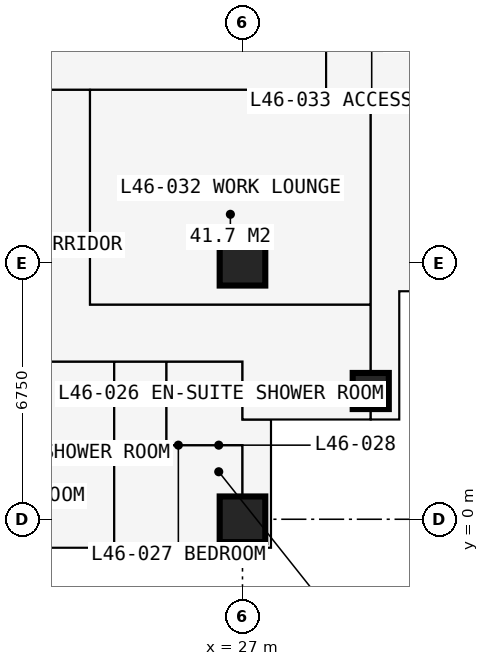
"""IFC4 building model, lengths in metres.
Left out: names, types, materials, properties, quantities, classifications, styles, units other than length and angle.
Written with IfcOpenShell. Run it as: python <this file> out.ifc"""

import sys

from ifc_helpers import new_model, si_unit, direction, frame, frame_2d, origin, origin_2d, place, context, subcontext, project, spatial, rectangle, extrude, element, fill, save


model = new_model("IFC4")
c1 = context("Model", 3, precision=1e-05, world=origin(), true_north=direction((0.0, 1.0)))
c2 = subcontext(c1, "Body", "Model", "MODEL_VIEW")
j1 = project(units=[si_unit("LENGTHUNIT", "METRE"), si_unit("PLANEANGLEUNIT", "RADIAN")], contexts=[c1])
p1 = place(None, origin())
s1 = spatial("IfcSite", under=j1, at=p1, CompositionType="ELEMENT")
p2 = place(p1, origin())
s2 = spatial("IfcBuilding", under=s1, at=p2, CompositionType="ELEMENT")
p3 = place(p2, frame((0.0, 0.0, 171.0)))
s3 = spatial("IfcBuildingStorey", under=s2, at=p3, CompositionType="ELEMENT", Elevation=171.0)
for number, where, z_axis, x_axis in (
    (1, (27.0, 0.0, 0.0), (0.0, 0.0, 1.0), (1.0, 0.0, 0.0)),
    (2, (27.0, 6.75, 0.0), (0.0, 0.0, 1.0), (1.0, 0.0, 0.0)),
):
    element("IfcColumn", number, at=place(p3, frame(where, z_axis=z_axis, x_axis=x_axis)), inside=s3, PredefinedType="COLUMN", context=c2, shape_type="SweptSolid", body=[
        extrude(rectangle(XDim=1.2, YDim=1.2, at=origin_2d()), origin(), (0.0, 0.0, 1.0), 3.6),
    ])
p4 = place(p3, frame((30.375, 3.375, 0.0), z_axis=(0.0, 0.0, 1.0), x_axis=(1.0, 0.0, 0.0)))
e3 = element("IfcColumn", 3, at=p4, inside=s3, PredefinedType="COLUMN", context=c2, shape_type="SweptSolid", body=[
    extrude(rectangle(XDim=0.95, YDim=0.95, at=origin_2d()), origin(), (0.0, 0.0, 1.0), 3.6),
])
p5 = place(p3, frame((27.75, -0.75, 0.0), z_axis=(0.0, 0.0, 1.0), x_axis=(0.0, 1.0, 0.0)))
e4 = element("IfcWall", 4, at=p5, inside=s3, PredefinedType="SOLIDWALL", context=c2, shape_type="SweptSolid", body=[
    extrude(rectangle(XDim=3.375, YDim=0.3, at=frame_2d((1.688, 0.0))), origin(), (0.0, 0.0, 1.0), 3.375),
])
p6 = place(p5, frame((0.788, 0.0, 0.6)))
e5 = element("IfcOpeningElement", 5, at=p6, cuts=e4, PredefinedType="OPENING", context=c2, shape_type="SweptSolid", body=[
    extrude(rectangle(XDim=1.8, YDim=2.1, at=frame_2d((0.9, 1.05))), frame((0.0, 0.16, 0.0), z_axis=(0.0, -1.0, 0.0), x_axis=(1.0, 0.0, 0.0)), (0.0, 0.0, 1.0), 0.32),
])
p7 = place(p3, frame((27.75, 2.625, 0.0), z_axis=(0.0, 0.0, 1.0), x_axis=(1.0, 0.0, 0.0)))
e6 = element("IfcWall", 6, at=p7, inside=s3, PredefinedType="SOLIDWALL", context=c2, shape_type="SweptSolid", body=[
    extrude(rectangle(XDim=3.375, YDim=0.3, at=frame_2d((1.688, 0.0))), origin(), (0.0, 0.0, 1.0), 3.375),
])
p8 = place(p7, frame((0.788, 0.0, 0.6)))
e7 = element("IfcOpeningElement", 7, at=p8, cuts=e6, PredefinedType="OPENING", context=c2, shape_type="SweptSolid", body=[
    extrude(rectangle(XDim=1.8, YDim=2.1, at=frame_2d((0.9, 1.05))), frame((0.0, 0.16, 0.0), z_axis=(0.0, -1.0, 0.0), x_axis=(1.0, 0.0, 0.0)), (0.0, 0.0, 1.0), 0.32),
])
p9 = place(p3, frame((31.125, 2.625, 0.0), z_axis=(0.0, 0.0, 1.0), x_axis=(0.0, 1.0, 0.0)))
e8 = element("IfcWall", 8, at=p9, inside=s3, PredefinedType="SOLIDWALL", context=c2, shape_type="SweptSolid", body=[
    extrude(rectangle(XDim=3.375, YDim=0.3, at=frame_2d((1.688, 0.0))), origin(), (0.0, 0.0, 1.0), 3.375),
])
p10 = place(p9, frame((0.788, 0.0, 0.6)))
e9 = element("IfcOpeningElement", 9, at=p10, cuts=e8, PredefinedType="OPENING", context=c2, shape_type="SweptSolid", body=[
    extrude(rectangle(XDim=1.8, YDim=2.1, at=frame_2d((0.9, 1.05))), frame((0.0, 0.16, 0.0), z_axis=(0.0, -1.0, 0.0), x_axis=(1.0, 0.0, 0.0)), (0.0, 0.0, 1.0), 0.32),
])
p11 = place(p3, frame((31.125, 6.0, 0.0), z_axis=(0.0, 0.0, 1.0), x_axis=(1.0, 0.0, 0.0)))
e10 = element("IfcWall", 10, at=p11, inside=s3, PredefinedType="SOLIDWALL", context=c2, shape_type="SweptSolid", body=[
    extrude(rectangle(XDim=3.375, YDim=0.3, at=frame_2d((1.688, 0.0))), origin(), (0.0, 0.0, 1.0), 3.375),
])
p12 = place(p11, frame((0.788, 0.0, 0.6)))
e11 = element("IfcOpeningElement", 11, at=p12, cuts=e10, PredefinedType="OPENING", context=c2, shape_type="SweptSolid", body=[
    extrude(rectangle(XDim=1.8, YDim=2.1, at=frame_2d((0.9, 1.05))), frame((0.0, 0.16, 0.0), z_axis=(0.0, -1.0, 0.0), x_axis=(1.0, 0.0, 0.0)), (0.0, 0.0, 1.0), 0.32),
])
p13 = place(p3, frame((6.75, 4.15, 0.0), z_axis=(0.0, 0.0, 1.0), x_axis=(1.0, 0.0, 0.0)))
e12 = element("IfcWall", 12, at=p13, inside=s3, PredefinedType="PARTITIONING", context=c2, shape_type="SweptSolid", body=[
    extrude(rectangle(XDim=20.25, YDim=0.15, at=frame_2d((10.125, 0.0))), origin(), (0.0, 0.0, 1.0), 3.375),
])
p14 = place(p13, frame((0.2, 0.0, 0.0)))
e13 = element("IfcOpeningElement", 13, at=p14, cuts=e12, PredefinedType="OPENING", context=c2, shape_type="SweptSolid", body=[
    extrude(rectangle(XDim=0.95, YDim=2.2, at=frame_2d((0.475, 1.1))), frame((0.0, 0.085, 0.0), z_axis=(0.0, -1.0, 0.0), x_axis=(1.0, 0.0, 0.0)), (0.0, 0.0, 1.0), 0.17),
])
p15 = place(p13, frame((3.625, 0.0, 0.0)))
e14 = element("IfcOpeningElement", 14, at=p15, cuts=e12, PredefinedType="OPENING", context=c2, shape_type="SweptSolid", body=[
    extrude(rectangle(XDim=0.95, YDim=2.2, at=frame_2d((0.475, 1.1))), frame((0.0, 0.085, 0.0), z_axis=(0.0, -1.0, 0.0), x_axis=(1.0, 0.0, 0.0)), (0.0, 0.0, 1.0), 0.17),
])
p16 = place(p13, frame((7.0, 0.0, 0.0)))
e15 = element("IfcOpeningElement", 15, at=p16, cuts=e12, PredefinedType="OPENING", context=c2, shape_type="SweptSolid", body=[
    extrude(rectangle(XDim=0.95, YDim=2.2, at=frame_2d((0.475, 1.1))), frame((0.0, 0.085, 0.0), z_axis=(0.0, -1.0, 0.0), x_axis=(1.0, 0.0, 0.0)), (0.0, 0.0, 1.0), 0.17),
])
p17 = place(p13, frame((10.375, 0.0, 0.0)))
e16 = element("IfcOpeningElement", 16, at=p17, cuts=e12, PredefinedType="OPENING", context=c2, shape_type="SweptSolid", body=[
    extrude(rectangle(XDim=0.95, YDim=2.2, at=frame_2d((0.475, 1.1))), frame((0.0, 0.085, 0.0), z_axis=(0.0, -1.0, 0.0), x_axis=(1.0, 0.0, 0.0)), (0.0, 0.0, 1.0), 0.17),
])
p18 = place(p13, frame((13.75, 0.0, 0.0)))
e17 = element("IfcOpeningElement", 17, at=p18, cuts=e12, PredefinedType="OPENING", context=c2, shape_type="SweptSolid", body=[
    extrude(rectangle(XDim=0.95, YDim=2.2, at=frame_2d((0.475, 1.1))), frame((0.0, 0.085, 0.0), z_axis=(0.0, -1.0, 0.0), x_axis=(1.0, 0.0, 0.0)), (0.0, 0.0, 1.0), 0.17),
])
p19 = place(p13, frame((17.125, 0.0, 0.0)))
e18 = element("IfcOpeningElement", 18, at=p19, cuts=e12, PredefinedType="OPENING", context=c2, shape_type="SweptSolid", body=[
    extrude(rectangle(XDim=0.95, YDim=2.2, at=frame_2d((0.475, 1.1))), frame((0.0, 0.085, 0.0), z_axis=(0.0, -1.0, 0.0), x_axis=(1.0, 0.0, 0.0)), (0.0, 0.0, 1.0), 0.17),
])
p20 = place(p3, frame((10.125, 11.3, 0.0), z_axis=(0.0, 0.0, 1.0), x_axis=(1.0, 0.0, 0.0)))
e19 = element("IfcWall", 19, at=p20, inside=s3, PredefinedType="PARTITIONING", context=c2, shape_type="SweptSolid", body=[
    extrude(rectangle(XDim=21.475, YDim=0.15, at=frame_2d((10.738, 0.0))), origin(), (0.0, 0.0, 1.0), 3.375),
])
p21 = place(p20, frame((11.312, 0.0, 0.0)))
e20 = element("IfcOpeningElement", 20, at=p21, cuts=e19, PredefinedType="OPENING", context=c2, shape_type="SweptSolid", body=[
    extrude(rectangle(XDim=1.0, YDim=2.2, at=frame_2d((0.5, 1.1))), frame((0.0, 0.085, 0.0), z_axis=(0.0, -1.0, 0.0), x_axis=(1.0, 0.0, 0.0)), (0.0, 0.0, 1.0), 0.17),
])
p22 = place(p3, frame((21.625, 1.95, 0.0), z_axis=(0.0, 0.0, 1.0), x_axis=(1.0, 0.0, 0.0)))
e21 = element("IfcWall", 21, at=p22, inside=s3, PredefinedType="PARTITIONING", context=c2, shape_type="SweptSolid", body=[
    extrude(rectangle(XDim=2.0, YDim=0.1, at=frame_2d((1.0, 0.0))), origin(), (0.0, 0.0, 1.0), 3.375),
])
p23 = place(p3, frame((22.988, 5.65, 0.0), z_axis=(0.0, 0.0, 1.0), x_axis=(1.0, 0.0, 0.0)))
e22 = element("IfcWall", 22, at=p23, inside=s3, PredefinedType="PARTITIONING", context=c2, shape_type="SweptSolid", body=[
    extrude(rectangle(XDim=7.387, YDim=0.15, at=frame_2d((3.694, 0.0))), origin(), (0.0, 0.0, 1.0), 3.375),
])
p24 = place(p23, frame((2.45, 0.0, 0.0)))
e23 = element("IfcOpeningElement", 23, at=p24, cuts=e22, PredefinedType="OPENING", context=c2, shape_type="SweptSolid", body=[
    extrude(rectangle(XDim=0.95, YDim=2.2, at=frame_2d((0.475, 1.1))), frame((0.0, 0.085, 0.0), z_axis=(0.0, -1.0, 0.0), x_axis=(1.0, 0.0, 0.0)), (0.0, 0.0, 1.0), 0.17),
])
p25 = place(p3, frame((22.988, 5.65, 0.0), z_axis=(0.0, 0.0, 1.0), x_axis=(0.0, 1.0, 0.0)))
e24 = element("IfcWall", 24, at=p25, inside=s3, PredefinedType="PARTITIONING", context=c2, shape_type="SweptSolid", body=[
    extrude(rectangle(XDim=5.65, YDim=0.15, at=frame_2d((2.825, 0.0))), origin(), (0.0, 0.0, 1.0), 3.375),
])
p26 = place(p3, frame((23.625, -0.734, 0.0), z_axis=(0.0, 0.0, 1.0), x_axis=(0.0, 1.0, 0.0)))
e25 = element("IfcWall", 25, at=p26, inside=s3, PredefinedType="PARTITIONING", context=c2, shape_type="SweptSolid", body=[
    extrude(rectangle(XDim=4.884, YDim=0.175, at=frame_2d((2.442, 0.0))), origin(), (0.0, 0.0, 1.0), 3.375),
])
p27 = place(p3, frame((25.0, 1.95, 0.0), z_axis=(0.0, 0.0, 1.0), x_axis=(0.0, 1.0, 0.0)))
e26 = element("IfcWall", 26, at=p27, inside=s3, PredefinedType="PARTITIONING", context=c2, shape_type="SweptSolid", body=[
    extrude(rectangle(XDim=2.2, YDim=0.1, at=frame_2d((1.1, 0.0))), origin(), (0.0, 0.0, 1.0), 3.375),
])
p28 = place(p3, frame((25.0, 1.95, 0.0), z_axis=(0.0, 0.0, 1.0), x_axis=(1.0, 0.0, 0.0)))
e27 = element("IfcWall", 27, at=p28, inside=s3, PredefinedType="PARTITIONING", context=c2, shape_type="SweptSolid", body=[
    extrude(rectangle(XDim=2.0, YDim=0.1, at=frame_2d((1.0, 0.0))), origin(), (0.0, 0.0, 1.0), 3.375),
])
p29 = place(p3, frame((27.0, -0.734, 0.0), z_axis=(0.0, 0.0, 1.0), x_axis=(0.0, 1.0, 0.0)))
e28 = element("IfcWall", 28, at=p29, inside=s3, PredefinedType="PARTITIONING", context=c2, shape_type="SweptSolid", body=[
    extrude(rectangle(XDim=2.684, YDim=0.1, at=frame_2d((1.342, 0.0))), origin(), (0.0, 0.0, 1.0), 2.877),
])
p30 = place(p29, frame((1.35, 0.0, 0.0)))
e29 = element("IfcOpeningElement", 29, at=p30, cuts=e28, PredefinedType="OPENING", context=c2, shape_type="SweptSolid", body=[
    extrude(rectangle(XDim=0.9, YDim=2.2, at=frame_2d((0.45, 1.1))), frame((0.0, 0.06, 0.0), z_axis=(0.0, -1.0, 0.0), x_axis=(1.0, 0.0, 0.0)), (0.0, 0.0, 1.0), 0.12),
])
p31 = place(p3, frame((27.0, 2.625, 0.0), z_axis=(0.0, 0.0, 1.0), x_axis=(0.0, 1.0, 0.0)))
e30 = element("IfcWall", 30, at=p31, inside=s3, PredefinedType="PARTITIONING", context=c2, shape_type="SweptSolid", body=[
    extrude(rectangle(XDim=1.525, YDim=0.1, at=frame_2d((0.762, 0.0))), origin(), (0.0, 0.0, 1.0), 2.877),
])
p32 = place(p3, frame((27.0, 2.625, 0.0), z_axis=(0.0, 0.0, 1.0), x_axis=(1.0, 0.0, 0.0)))
e31 = element("IfcWall", 31, at=p32, inside=s3, PredefinedType="PARTITIONING", context=c2, shape_type="SweptSolid", body=[
    extrude(rectangle(XDim=0.734, YDim=0.1, at=frame_2d((0.367, 0.0))), origin(), (0.0, 0.0, 1.0), 3.375),
])
p33 = place(p3, frame((29.2, 11.3, 0.0), z_axis=(0.0, 0.0, 1.0), x_axis=(0.0, 1.0, 0.0)))
e32 = element("IfcWall", 32, at=p33, inside=s3, PredefinedType="PARTITIONING", context=c2, shape_type="SweptSolid", body=[
    extrude(rectangle(XDim=19.809, YDim=0.15, at=frame_2d((9.904, 0.0))), origin(), (0.0, 0.0, 1.0), 3.375),
])
p34 = place(p33, frame((0.55, 0.0, 0.0)))
e33 = element("IfcOpeningElement", 33, at=p34, cuts=e32, PredefinedType="OPENING", context=c2, shape_type="SweptSolid", body=[
    extrude(rectangle(XDim=1.0, YDim=2.2, at=frame_2d((0.5, 1.1))), frame((0.0, 0.085, 0.0), z_axis=(0.0, -1.0, 0.0), x_axis=(1.0, 0.0, 0.0)), (0.0, 0.0, 1.0), 0.17),
])
p35 = place(p33, frame((2.65, 0.0, 0.0)))
e34 = element("IfcOpeningElement", 34, at=p35, cuts=e32, PredefinedType="OPENING", context=c2, shape_type="SweptSolid", body=[
    extrude(rectangle(XDim=1.0, YDim=2.2, at=frame_2d((0.5, 1.1))), frame((0.0, 0.085, 0.0), z_axis=(0.0, -1.0, 0.0), x_axis=(1.0, 0.0, 0.0)), (0.0, 0.0, 1.0), 0.17),
])
p36 = place(p33, frame((7.45, 0.0, 0.0)))
e35 = element("IfcOpeningElement", 35, at=p36, cuts=e32, PredefinedType="OPENING", context=c2, shape_type="SweptSolid", body=[
    extrude(rectangle(XDim=1.5, YDim=2.2, at=frame_2d((0.75, 1.1))), frame((0.0, 0.085, 0.0), z_axis=(0.0, -1.0, 0.0), x_axis=(1.0, 0.0, 0.0)), (0.0, 0.0, 1.0), 0.17),
])
p37 = place(p3, frame((30.375, 2.775, 0.0), z_axis=(0.0, 0.0, 1.0), x_axis=(0.0, 1.0, 0.0)))
e36 = element("IfcWall", 36, at=p37, inside=s3, PredefinedType="PARTITIONING", context=c2, shape_type="SweptSolid", body=[
    extrude(rectangle(XDim=8.525, YDim=0.15, at=frame_2d((4.263, 0.0))), origin(), (0.0, 0.0, 1.0), 2.877),
])
p38 = place(p6, origin())
e37 = element("IfcWindow", 37, at=p38, inside=s3, PartitioningType="SINGLE_PANEL", PredefinedType="WINDOW", context=c2, shape_type="SweptSolid", body=[
    extrude(rectangle(XDim=1.8, YDim=2.1, at=frame_2d((0.9, 1.05))), frame((0.0, 0.03, 0.0), z_axis=(0.0, -1.0, 0.0), x_axis=(1.0, 0.0, 0.0)), (0.0, 0.0, 1.0), 0.06),
])
fill(e5, e37)
p39 = place(p8, origin())
e38 = element("IfcWindow", 38, at=p39, inside=s3, PartitioningType="SINGLE_PANEL", PredefinedType="WINDOW", context=c2, shape_type="SweptSolid", body=[
    extrude(rectangle(XDim=1.8, YDim=2.1, at=frame_2d((0.9, 1.05))), frame((0.0, 0.03, 0.0), z_axis=(0.0, -1.0, 0.0), x_axis=(1.0, 0.0, 0.0)), (0.0, 0.0, 1.0), 0.06),
])
fill(e7, e38)
p40 = place(p10, origin())
e39 = element("IfcWindow", 39, at=p40, inside=s3, PartitioningType="SINGLE_PANEL", PredefinedType="WINDOW", context=c2, shape_type="SweptSolid", body=[
    extrude(rectangle(XDim=1.8, YDim=2.1, at=frame_2d((0.9, 1.05))), frame((0.0, 0.03, 0.0), z_axis=(0.0, -1.0, 0.0), x_axis=(1.0, 0.0, 0.0)), (0.0, 0.0, 1.0), 0.06),
])
fill(e9, e39)
p41 = place(p19, origin())
e40 = element("IfcDoor", 40, at=p41, inside=s3, OperationType="SINGLE_SWING_LEFT", PredefinedType="DOOR", context=c2, shape_type="SweptSolid", body=[
    extrude(rectangle(XDim=0.95, YDim=2.2, at=frame_2d((0.475, 1.1))), frame((0.0, 0.025, 0.0), z_axis=(0.0, -1.0, 0.0), x_axis=(1.0, 0.0, 0.0)), (0.0, 0.0, 1.0), 0.05),
])
fill(e18, e40)
p42 = place(p30, origin())
e41 = element("IfcDoor", 41, at=p42, inside=s3, OperationType="SINGLE_SWING_RIGHT", PredefinedType="DOOR", context=c2, shape_type="SweptSolid", body=[
    extrude(rectangle(XDim=0.9, YDim=2.2, at=frame_2d((0.45, 1.1))), frame((0.0, 0.025, 0.0), z_axis=(0.0, -1.0, 0.0), x_axis=(1.0, 0.0, 0.0)), (0.0, 0.0, 1.0), 0.05),
])
fill(e29, e41)
p43 = place(p21, origin())
e42 = element("IfcDoor", 42, at=p43, inside=s3, OperationType="SINGLE_SWING_LEFT", PredefinedType="DOOR", context=c2, shape_type="SweptSolid", body=[
    extrude(rectangle(XDim=1.0, YDim=2.2, at=frame_2d((0.5, 1.1))), frame((0.0, 0.025, 0.0), z_axis=(0.0, -1.0, 0.0), x_axis=(1.0, 0.0, 0.0)), (0.0, 0.0, 1.0), 0.05),
])
fill(e20, e42)
p44 = place(p24, origin())
e43 = element("IfcDoor", 43, at=p44, inside=s3, OperationType="SINGLE_SWING_LEFT", PredefinedType="DOOR", context=c2, shape_type="SweptSolid", body=[
    extrude(rectangle(XDim=0.95, YDim=2.2, at=frame_2d((0.475, 1.1))), frame((0.0, 0.025, 0.0), z_axis=(0.0, -1.0, 0.0), x_axis=(1.0, 0.0, 0.0)), (0.0, 0.0, 1.0), 0.05),
])
fill(e23, e43)
p45 = place(p34, origin())
e44 = element("IfcDoor", 44, at=p45, inside=s3, OperationType="SINGLE_SWING_LEFT", PredefinedType="DOOR", context=c2, shape_type="SweptSolid", body=[
    extrude(rectangle(XDim=1.0, YDim=2.2, at=frame_2d((0.5, 1.1))), frame((0.0, 0.025, 0.0), z_axis=(0.0, -1.0, 0.0), x_axis=(1.0, 0.0, 0.0)), (0.0, 0.0, 1.0), 0.05),
])
fill(e33, e44)
save(model, sys.argv[1])
